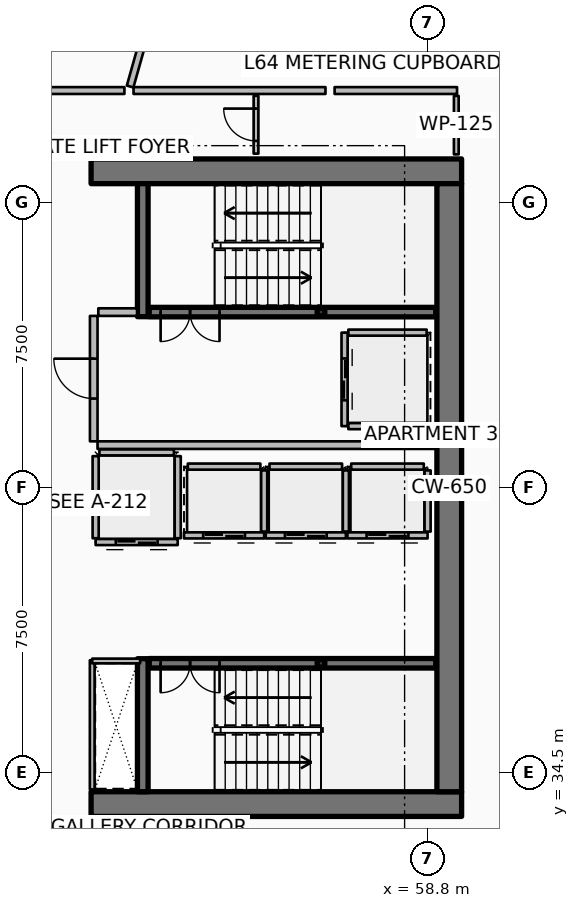
"""IFC4 building model, lengths in metres.
Left out: names, types, materials, properties, quantities, classifications, styles, units other than length and angle.
Written with IfcOpenShell. Run it as: python <this file> out.ifc"""

import sys

from ifc_helpers import new_model, si_unit, direction, frame, frame_2d, origin, origin_2d, place, context, subcontext, project, spatial, rectangle, hollow_rectangle, extrude, element, fill, save


model = new_model("IFC4")
c1 = context("Model", 3, precision=1e-05, world=origin(), true_north=direction((0.0, 1.0)))
c2 = subcontext(c1, "Body", "Model", "MODEL_VIEW")
j1 = project(units=[si_unit("LENGTHUNIT", "METRE"), si_unit("PLANEANGLEUNIT", "RADIAN")], contexts=[c1])
p1 = place(None, origin())
s1 = spatial("IfcSite", under=j1, at=p1, CompositionType="ELEMENT")
p2 = place(p1, origin())
s2 = spatial("IfcBuilding", under=s1, at=p2, CompositionType="ELEMENT")
p3 = place(p2, frame((0.0, 0.0, 255.95)))
s3 = spatial("IfcBuildingStorey", under=s2, at=p3, CompositionType="ELEMENT", Elevation=255.95)
for number, where, z_axis, x_axis in (
    (1, (49.95, 33.675, 0.0), (0.0, 0.0, 1.0), (1.0, 0.0, 0.0)),
    (2, (49.95, 50.325, 0.0), (0.0, 0.0, 1.0), (1.0, 0.0, 0.0)),
):
    element("IfcWall", number, at=place(p3, frame(where, z_axis=z_axis, x_axis=x_axis)), inside=s3, PredefinedType="SHEAR", context=c2, shape_type="SweptSolid", body=[
        extrude(rectangle(XDim=9.75, YDim=0.65, at=frame_2d((4.875, 0.0))), origin(), (0.0, 0.0, 1.0), 3.85),
    ])
p4 = place(p3, frame((59.375, 34.0, 0.0), z_axis=(0.0, 0.0, 1.0), x_axis=(0.0, 1.0, 0.0)))
e3 = element("IfcWall", 3, at=p4, inside=s3, PredefinedType="SHEAR", context=c2, shape_type="SweptSolid", body=[
    extrude(rectangle(XDim=16.0, YDim=0.65, at=frame_2d((8.0, 0.0))), origin(), (0.0, 0.0, 1.0), 3.85),
])
for number, where, z_axis, x_axis in (
    (4, (51.31, 46.5, 0.0), (0.0, 0.0, 1.0), (0.0, 1.0, 0.0)),
    (5, (51.31, 34.0, 0.0), (0.0, 0.0, 1.0), (0.0, 1.0, 0.0)),
):
    element("IfcWall", number, at=place(p3, frame(where, z_axis=z_axis, x_axis=x_axis)), inside=s3, PredefinedType="SHEAR", context=c2, shape_type="SweptSolid", body=[
        extrude(rectangle(XDim=3.5, YDim=0.28, at=frame_2d((1.75, 0.0))), origin(), (0.0, 0.0, 1.0), 3.85),
    ])
for number, where, z_axis, x_axis in (
    (6, (56.0, 46.62, 0.0), (0.0, 0.0, 1.0), (1.0, 0.0, 0.0)),
    (7, (56.0, 37.38, 0.0), (0.0, 0.0, 1.0), (1.0, 0.0, 0.0)),
):
    element("IfcColumn", number, at=place(p3, frame(where, z_axis=z_axis, x_axis=x_axis)), inside=s3, PredefinedType="COLUMN", context=c2, shape_type="SweptSolid", body=[
        extrude(hollow_rectangle(XDim=0.2, YDim=0.2, WallThickness=0.01, InnerFilletRadius=0.01, OuterFilletRadius=0.02, at=origin_2d()), origin(), (0.0, 0.0, 1.0), 1.72),
    ])
p5 = place(p3, frame((51.48, 46.62, 0.0), z_axis=(0.0, 0.0, 1.0), x_axis=(1.0, 0.0, 0.0)))
e8 = element("IfcWall", 8, at=p5, inside=s3, PredefinedType="SOLIDWALL", context=c2, shape_type="SweptSolid", body=[
    extrude(rectangle(XDim=7.54, YDim=0.25, at=frame_2d((3.77, 0.0))), origin(), (0.0, 0.0, 1.0), 3.59),
])
p6 = place(p5, frame((0.3, 0.0, 0.0)))
e9 = element("IfcOpeningElement", 9, at=p6, cuts=e8, PredefinedType="OPENING", context=c2, shape_type="SweptSolid", body=[
    extrude(rectangle(XDim=1.55, YDim=2.15, at=frame_2d((0.775, 1.075))), frame((0.0, 0.135, 0.0), z_axis=(0.0, -1.0, 0.0), x_axis=(1.0, 0.0, 0.0)), (0.0, 0.0, 1.0), 0.27),
])
p7 = place(p3, frame((51.48, 37.38, 0.0), z_axis=(0.0, 0.0, 1.0), x_axis=(1.0, 0.0, 0.0)))
e10 = element("IfcWall", 10, at=p7, inside=s3, PredefinedType="SOLIDWALL", context=c2, shape_type="SweptSolid", body=[
    extrude(rectangle(XDim=7.54, YDim=0.25, at=frame_2d((3.77, 0.0))), origin(), (0.0, 0.0, 1.0), 3.59),
])
p8 = place(p7, frame((0.3, 0.0, 0.0)))
e11 = element("IfcOpeningElement", 11, at=p8, cuts=e10, PredefinedType="OPENING", context=c2, shape_type="SweptSolid", body=[
    extrude(rectangle(XDim=1.55, YDim=2.15, at=frame_2d((0.775, 1.075))), frame((0.0, 0.135, 0.0), z_axis=(0.0, -1.0, 0.0), x_axis=(1.0, 0.0, 0.0)), (0.0, 0.0, 1.0), 0.27),
])
p9 = place(p3, frame((54.505, 40.745, 0.0), z_axis=(0.0, 0.0, 1.0), x_axis=(-1.0, 0.0, 0.0)))
e12 = element("IfcWall", 12, at=p9, inside=s3, PredefinedType="PARTITIONING", context=c2, shape_type="SweptSolid", body=[
    extrude(rectangle(XDim=2.11, YDim=0.16, at=frame_2d((1.055, 0.0))), origin(), (0.0, 0.0, 1.0), 3.59),
])
p10 = place(p9, frame((0.505, 0.0, 0.0)))
e13 = element("IfcOpeningElement", 13, at=p10, cuts=e12, PredefinedType="OPENING", context=c2, shape_type="SweptSolid", body=[
    extrude(rectangle(XDim=1.1, YDim=2.1, at=frame_2d((0.55, 1.05))), frame((0.0, 0.09, 0.0), z_axis=(0.0, -1.0, 0.0), x_axis=(1.0, 0.0, 0.0)), (0.0, 0.0, 1.0), 0.18),
])
p11 = place(p3, frame((54.505, 40.845, 0.0), z_axis=(0.0, 0.0, 1.0), x_axis=(0.0, 1.0, 0.0)))
e14 = element("IfcWall", 14, at=p11, inside=s3, PredefinedType="PARTITIONING", context=c2, shape_type="SweptSolid", body=[
    extrude(rectangle(XDim=1.61, YDim=0.16, at=frame_2d((0.805, 0.0))), origin(), (0.0, 0.0, 1.0), 3.59),
])
p12 = place(p3, frame((52.495, 42.555, 0.0), z_axis=(0.0, 0.0, 1.0), x_axis=(1.0, 0.0, 0.0)))
e15 = element("IfcWall", 15, at=p12, inside=s3, PredefinedType="PARTITIONING", context=c2, shape_type="SweptSolid", body=[
    extrude(rectangle(XDim=1.91, YDim=0.16, at=frame_2d((0.955, 0.0))), origin(), (0.0, 0.0, 1.0), 3.59),
])
p13 = place(p3, frame((56.655, 40.745, 0.0), z_axis=(0.0, 0.0, 1.0), x_axis=(-1.0, 0.0, 0.0)))
e16 = element("IfcWall", 16, at=p13, inside=s3, PredefinedType="PARTITIONING", context=c2, shape_type="SweptSolid", body=[
    extrude(rectangle(XDim=2.11, YDim=0.16, at=frame_2d((1.055, 0.0))), origin(), (0.0, 0.0, 1.0), 3.59),
])
p14 = place(p13, frame((0.505, 0.0, 0.0)))
e17 = element("IfcOpeningElement", 17, at=p14, cuts=e16, PredefinedType="OPENING", context=c2, shape_type="SweptSolid", body=[
    extrude(rectangle(XDim=1.1, YDim=2.1, at=frame_2d((0.55, 1.05))), frame((0.0, 0.09, 0.0), z_axis=(0.0, -1.0, 0.0), x_axis=(1.0, 0.0, 0.0)), (0.0, 0.0, 1.0), 0.18),
])
p15 = place(p3, frame((56.655, 40.845, 0.0), z_axis=(0.0, 0.0, 1.0), x_axis=(0.0, 1.0, 0.0)))
e18 = element("IfcWall", 18, at=p15, inside=s3, PredefinedType="PARTITIONING", context=c2, shape_type="SweptSolid", body=[
    extrude(rectangle(XDim=1.61, YDim=0.16, at=frame_2d((0.805, 0.0))), origin(), (0.0, 0.0, 1.0), 3.59),
])
p16 = place(p3, frame((54.645, 42.555, 0.0), z_axis=(0.0, 0.0, 1.0), x_axis=(1.0, 0.0, 0.0)))
e19 = element("IfcWall", 19, at=p16, inside=s3, PredefinedType="PARTITIONING", context=c2, shape_type="SweptSolid", body=[
    extrude(rectangle(XDim=1.91, YDim=0.16, at=frame_2d((0.955, 0.0))), origin(), (0.0, 0.0, 1.0), 3.59),
])
p17 = place(p3, frame((58.805, 40.745, 0.0), z_axis=(0.0, 0.0, 1.0), x_axis=(-1.0, 0.0, 0.0)))
e20 = element("IfcWall", 20, at=p17, inside=s3, PredefinedType="PARTITIONING", context=c2, shape_type="SweptSolid", body=[
    extrude(rectangle(XDim=2.11, YDim=0.16, at=frame_2d((1.055, 0.0))), origin(), (0.0, 0.0, 1.0), 3.59),
])
p18 = place(p17, frame((0.505, 0.0, 0.0)))
e21 = element("IfcOpeningElement", 21, at=p18, cuts=e20, PredefinedType="OPENING", context=c2, shape_type="SweptSolid", body=[
    extrude(rectangle(XDim=1.1, YDim=2.1, at=frame_2d((0.55, 1.05))), frame((0.0, 0.09, 0.0), z_axis=(0.0, -1.0, 0.0), x_axis=(1.0, 0.0, 0.0)), (0.0, 0.0, 1.0), 0.18),
])
p19 = place(p3, frame((58.805, 40.845, 0.0), z_axis=(0.0, 0.0, 1.0), x_axis=(0.0, 1.0, 0.0)))
e22 = element("IfcWall", 22, at=p19, inside=s3, PredefinedType="PARTITIONING", context=c2, shape_type="SweptSolid", body=[
    extrude(rectangle(XDim=1.61, YDim=0.16, at=frame_2d((0.805, 0.0))), origin(), (0.0, 0.0, 1.0), 3.59),
])
p20 = place(p3, frame((56.795, 42.555, 0.0), z_axis=(0.0, 0.0, 1.0), x_axis=(1.0, 0.0, 0.0)))
e23 = element("IfcWall", 23, at=p20, inside=s3, PredefinedType="PARTITIONING", context=c2, shape_type="SweptSolid", body=[
    extrude(rectangle(XDim=1.91, YDim=0.16, at=frame_2d((0.955, 0.0))), origin(), (0.0, 0.0, 1.0), 3.59),
])
p21 = place(p3, frame((56.62, 46.08, 0.0), z_axis=(0.0, 0.0, 1.0), x_axis=(0.0, -1.0, 0.0)))
e24 = element("IfcWall", 24, at=p21, inside=s3, PredefinedType="PARTITIONING", context=c2, shape_type="SweptSolid", body=[
    extrude(rectangle(XDim=2.46, YDim=0.16, at=frame_2d((1.23, 0.0))), origin(), (0.0, 0.0, 1.0), 3.59),
])
p22 = place(p21, frame((0.68, 0.0, 0.0)))
e25 = element("IfcOpeningElement", 25, at=p22, cuts=e24, PredefinedType="OPENING", context=c2, shape_type="SweptSolid", body=[
    extrude(rectangle(XDim=1.1, YDim=2.1, at=frame_2d((0.55, 1.05))), frame((0.0, 0.09, 0.0), z_axis=(0.0, -1.0, 0.0), x_axis=(1.0, 0.0, 0.0)), (0.0, 0.0, 1.0), 0.18),
])
for number, where, z_axis, x_axis in (
    (26, (56.72, 46.08, 0.0), (0.0, 0.0, 1.0), (1.0, 0.0, 0.0)),
    (27, (56.72, 43.62, 0.0), (0.0, 0.0, 1.0), (1.0, 0.0, 0.0)),
):
    element("IfcWall", number, at=place(p3, frame(where, z_axis=z_axis, x_axis=x_axis)), inside=s3, PredefinedType="PARTITIONING", context=c2, shape_type="SweptSolid", body=[
        extrude(rectangle(XDim=2.06, YDim=0.16, at=frame_2d((1.03, 0.0))), origin(), (0.0, 0.0, 1.0), 3.59),
    ])
p23 = place(p3, frame((52.23, 40.57, 0.0), z_axis=(0.0, 0.0, 1.0), x_axis=(-1.0, 0.0, 0.0)))
e28 = element("IfcWall", 28, at=p23, inside=s3, PredefinedType="PARTITIONING", context=c2, shape_type="SweptSolid", body=[
    extrude(rectangle(XDim=2.16, YDim=0.16, at=frame_2d((1.08, 0.0))), origin(), (0.0, 0.0, 1.0), 3.59),
])
p24 = place(p23, frame((0.53, 0.0, 0.0)))
e29 = element("IfcOpeningElement", 29, at=p24, cuts=e28, PredefinedType="OPENING", context=c2, shape_type="SweptSolid", body=[
    extrude(rectangle(XDim=1.1, YDim=2.1, at=frame_2d((0.55, 1.05))), frame((0.0, 0.09, 0.0), z_axis=(0.0, -1.0, 0.0), x_axis=(1.0, 0.0, 0.0)), (0.0, 0.0, 1.0), 0.18),
])
for number, where, z_axis, x_axis in (
    (30, (52.23, 40.67, 0.0), (0.0, 0.0, 1.0), (0.0, 1.0, 0.0)),
    (31, (50.07, 40.67, 0.0), (0.0, 0.0, 1.0), (0.0, 1.0, 0.0)),
):
    element("IfcWall", number, at=place(p3, frame(where, z_axis=z_axis, x_axis=x_axis)), inside=s3, PredefinedType="PARTITIONING", context=c2, shape_type="SweptSolid", body=[
        extrude(rectangle(XDim=2.16, YDim=0.16, at=frame_2d((1.08, 0.0))), origin(), (0.0, 0.0, 1.0), 3.59),
    ])
p25 = place(p3, frame((50.17, 42.93, 0.0), z_axis=(0.0, 0.0, 1.0), x_axis=(1.0, 0.0, 0.0)))
e32 = element("IfcWall", 32, at=p25, inside=s3, PredefinedType="PARTITIONING", context=c2, shape_type="SweptSolid", body=[
    extrude(rectangle(XDim=1.96, YDim=0.16, at=frame_2d((0.98, 0.0))), origin(), (0.0, 0.0, 1.0), 3.59),
])
p26 = place(p3, frame((50.12, 43.12, 0.0), z_axis=(0.0, 0.0, 1.0), x_axis=(1.0, 0.0, 0.0)))
e33 = element("IfcWall", 33, at=p26, inside=s3, PredefinedType="PARTITIONING", context=c2, shape_type="SweptSolid", body=[
    extrude(rectangle(XDim=8.88, YDim=0.2, at=frame_2d((4.44, 0.0))), origin(), (0.0, 0.0, 1.0), 3.59),
])
p27 = place(p3, frame((50.14, 46.62, 0.0), z_axis=(0.0, 0.0, 1.0), x_axis=(1.0, 0.0, 0.0)))
e34 = element("IfcWall", 34, at=p27, inside=s3, PredefinedType="PARTITIONING", context=c2, shape_type="SweptSolid", body=[
    extrude(rectangle(XDim=1.02, YDim=0.2, at=frame_2d((0.51, 0.0))), origin(), (0.0, 0.0, 1.0), 3.59),
])
p28 = place(p3, frame((50.02, 43.22, 0.0), z_axis=(0.0, 0.0, 1.0), x_axis=(0.0, 1.0, 0.0)))
e35 = element("IfcWall", 35, at=p28, inside=s3, PredefinedType="PARTITIONING", context=c2, shape_type="SweptSolid", body=[
    extrude(rectangle(XDim=3.3, YDim=0.2, at=frame_2d((1.65, 0.0))), origin(), (0.0, 0.0, 1.0), 3.59),
])
p29 = place(p28, frame((1.125, 0.0, 0.0)))
e36 = element("IfcOpeningElement", 36, at=p29, cuts=e35, PredefinedType="OPENING", context=c2, shape_type="SweptSolid", body=[
    extrude(rectangle(XDim=1.05, YDim=2.1, at=frame_2d((0.525, 1.05))), frame((0.0, 0.11, 0.0), z_axis=(0.0, -1.0, 0.0), x_axis=(1.0, 0.0, 0.0)), (0.0, 0.0, 1.0), 0.22),
])
p30 = place(p3, frame((49.98, 34.06, 0.0), z_axis=(0.0, 0.0, 1.0), x_axis=(0.0, 1.0, 0.0)))
e37 = element("IfcWall", 37, at=p30, inside=s3, PredefinedType="PARTITIONING", context=c2, shape_type="SweptSolid", body=[
    extrude(rectangle(XDim=3.4, YDim=0.125, at=frame_2d((1.7, 0.0))), origin(), (0.0, 0.0, 1.0), 3.03),
])
p31 = place(p3, frame((49.98, 37.44, 0.0), z_axis=(0.0, 0.0, 1.0), x_axis=(1.0, 0.0, 0.0)))
e38 = element("IfcWall", 38, at=p31, inside=s3, PredefinedType="PARTITIONING", context=c2, shape_type="SweptSolid", body=[
    extrude(rectangle(XDim=1.26, YDim=0.125, at=frame_2d((0.63, 0.0))), origin(), (0.0, 0.0, 1.0), 3.03),
])
p32 = place(p3, frame((59.56, 50.77, 0.0), z_axis=(0.0, 0.0, 1.0), x_axis=(0.0, 1.0, 0.0)))
e39 = element("IfcWall", 39, at=p32, inside=s3, PredefinedType="PARTITIONING", context=c2, shape_type="SweptSolid", body=[
    extrude(rectangle(XDim=1.54, YDim=0.125, at=frame_2d((0.77, 0.0))), origin(), (0.0, 0.0, 1.0), 3.03),
])
p33 = place(p3, frame((54.29, 50.79, 0.0), z_axis=(0.0, 0.0, 1.0), x_axis=(0.0, 1.0, 0.0)))
e40 = element("IfcWall", 40, at=p33, inside=s3, PredefinedType="PARTITIONING", context=c2, shape_type="SweptSolid", body=[
    extrude(rectangle(XDim=1.52, YDim=0.125, at=frame_2d((0.76, 0.0))), origin(), (0.0, 0.0, 1.0), 3.03),
])
p34 = place(p33, frame((0.335, 0.0, 0.0)))
e41 = element("IfcOpeningElement", 41, at=p34, cuts=e40, PredefinedType="OPENING", context=c2, shape_type="SweptSolid", body=[
    extrude(rectangle(XDim=0.85, YDim=2.06, at=frame_2d((0.425, 1.03))), frame((0.0, 0.073, 0.0), z_axis=(0.0, -1.0, 0.0), x_axis=(1.0, 0.0, 0.0)), (0.0, 0.0, 1.0), 0.145),
])
p35 = place(p3, frame((50.977, 52.556, 0.0), z_axis=(0.0, 0.0, 1.0), x_axis=(0.271442063103, 0.962454781472, 0.0)))
e42 = element("IfcWall", 42, at=p35, inside=s3, PredefinedType="PARTITIONING", context=c2, shape_type="SweptSolid", body=[
    extrude(rectangle(XDim=16.017, YDim=0.18, at=frame_2d((8.008, 0.0))), origin(), (0.0, 0.0, 1.0), 2.957),
])
p36 = place(p3, frame((50.827, 52.45, 0.0), z_axis=(0.0, 0.0, 1.0), x_axis=(-1.0, 0.0, 0.0)))
e43 = element("IfcWall", 43, at=p36, inside=s3, PredefinedType="PARTITIONING", context=c2, shape_type="SweptSolid", body=[
    extrude(rectangle(XDim=3.944, YDim=0.18, at=frame_2d((1.972, 0.0))), origin(), (0.0, 0.0, 1.0), 2.957),
])
p37 = place(p3, frame((59.58, 52.45, 0.0), z_axis=(0.0, 0.0, 1.0), x_axis=(-1.0, 0.0, 0.0)))
e44 = element("IfcWall", 44, at=p37, inside=s3, PredefinedType="PARTITIONING", context=c2, shape_type="SweptSolid", body=[
    extrude(rectangle(XDim=3.222, YDim=0.18, at=frame_2d((1.611, 0.0))), origin(), (0.0, 0.0, 1.0), 2.957),
])
p38 = place(p3, frame((56.118, 52.45, 0.0), z_axis=(0.0, 0.0, 1.0), x_axis=(-1.0, 0.0, 0.0)))
e45 = element("IfcWall", 45, at=p38, inside=s3, PredefinedType="PARTITIONING", context=c2, shape_type="SweptSolid", body=[
    extrude(rectangle(XDim=5.051, YDim=0.18, at=frame_2d((2.525, 0.0))), origin(), (0.0, 0.0, 1.0), 2.957),
])
p39 = place(p6, origin())
e46 = element("IfcDoor", 46, at=p39, inside=s3, OperationType="DOUBLE_DOOR_SINGLE_SWING", PredefinedType="DOOR", context=c2, shape_type="SweptSolid", body=[
    extrude(rectangle(XDim=1.55, YDim=2.15, at=frame_2d((0.775, 1.075))), frame((0.0, 0.025, 0.0), z_axis=(0.0, -1.0, 0.0), x_axis=(1.0, 0.0, 0.0)), (0.0, 0.0, 1.0), 0.05),
])
fill(e9, e46)
p40 = place(p8, origin())
e47 = element("IfcDoor", 47, at=p40, inside=s3, OperationType="DOUBLE_DOOR_SINGLE_SWING", PredefinedType="DOOR", context=c2, shape_type="SweptSolid", body=[
    extrude(rectangle(XDim=1.55, YDim=2.15, at=frame_2d((0.775, 1.075))), frame((0.0, 0.025, 0.0), z_axis=(0.0, -1.0, 0.0), x_axis=(1.0, 0.0, 0.0)), (0.0, 0.0, 1.0), 0.05),
])
fill(e11, e47)
p41 = place(p10, origin())
e48 = element("IfcDoor", 48, at=p41, inside=s3, OperationType="DOUBLE_DOOR_SLIDING", PredefinedType="DOOR", context=c2, shape_type="SweptSolid", body=[
    extrude(rectangle(XDim=1.1, YDim=2.1, at=frame_2d((0.55, 1.05))), frame((0.0, 0.025, 0.0), z_axis=(0.0, -1.0, 0.0), x_axis=(1.0, 0.0, 0.0)), (0.0, 0.0, 1.0), 0.05),
])
fill(e13, e48)
p42 = place(p14, origin())
e49 = element("IfcDoor", 49, at=p42, inside=s3, OperationType="DOUBLE_DOOR_SLIDING", PredefinedType="DOOR", context=c2, shape_type="SweptSolid", body=[
    extrude(rectangle(XDim=1.1, YDim=2.1, at=frame_2d((0.55, 1.05))), frame((0.0, 0.025, 0.0), z_axis=(0.0, -1.0, 0.0), x_axis=(1.0, 0.0, 0.0)), (0.0, 0.0, 1.0), 0.05),
])
fill(e17, e49)
p43 = place(p18, origin())
e50 = element("IfcDoor", 50, at=p43, inside=s3, OperationType="DOUBLE_DOOR_SLIDING", PredefinedType="DOOR", context=c2, shape_type="SweptSolid", body=[
    extrude(rectangle(XDim=1.1, YDim=2.1, at=frame_2d((0.55, 1.05))), frame((0.0, 0.025, 0.0), z_axis=(0.0, -1.0, 0.0), x_axis=(1.0, 0.0, 0.0)), (0.0, 0.0, 1.0), 0.05),
])
fill(e21, e50)
p44 = place(p22, origin())
e51 = element("IfcDoor", 51, at=p44, inside=s3, OperationType="DOUBLE_DOOR_SLIDING", PredefinedType="DOOR", context=c2, shape_type="SweptSolid", body=[
    extrude(rectangle(XDim=1.1, YDim=2.1, at=frame_2d((0.55, 1.05))), frame((0.0, 0.025, 0.0), z_axis=(0.0, -1.0, 0.0), x_axis=(1.0, 0.0, 0.0)), (0.0, 0.0, 1.0), 0.05),
])
fill(e25, e51)
p45 = place(p24, origin())
e52 = element("IfcDoor", 52, at=p45, inside=s3, OperationType="DOUBLE_DOOR_SLIDING", PredefinedType="DOOR", context=c2, shape_type="SweptSolid", body=[
    extrude(rectangle(XDim=1.1, YDim=2.1, at=frame_2d((0.55, 1.05))), frame((0.0, 0.025, 0.0), z_axis=(0.0, -1.0, 0.0), x_axis=(1.0, 0.0, 0.0)), (0.0, 0.0, 1.0), 0.05),
])
fill(e29, e52)
p46 = place(p29, origin())
e53 = element("IfcDoor", 53, at=p46, inside=s3, OperationType="SINGLE_SWING_RIGHT", PredefinedType="DOOR", context=c2, shape_type="SweptSolid", body=[
    extrude(rectangle(XDim=1.05, YDim=2.1, at=frame_2d((0.525, 1.05))), frame((0.0, 0.025, 0.0), z_axis=(0.0, -1.0, 0.0), x_axis=(1.0, 0.0, 0.0)), (0.0, 0.0, 1.0), 0.05),
])
fill(e36, e53)
p47 = place(p34, origin())
e54 = element("IfcDoor", 54, at=p47, inside=s3, OperationType="SINGLE_SWING_RIGHT", PredefinedType="DOOR", context=c2, shape_type="SweptSolid", body=[
    extrude(rectangle(XDim=0.85, YDim=2.06, at=frame_2d((0.425, 1.03))), frame((0.0, 0.025, 0.0), z_axis=(0.0, -1.0, 0.0), x_axis=(1.0, 0.0, 0.0)), (0.0, 0.0, 1.0), 0.05),
])
fill(e41, e54)
save(model, sys.argv[1])
